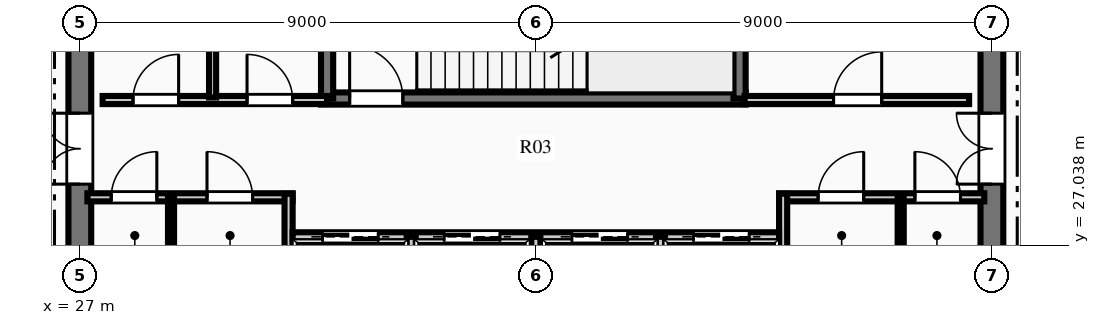
"""IFC4 building model, lengths in metres.
Left out: names, types, materials, properties, quantities, classifications, styles, units other than length and angle.
Written with IfcOpenShell. Run it as: python <this file> out.ifc"""

import sys

from ifc_helpers import new_model, si_unit, direction, frame, frame_2d, origin, place, context, subcontext, project, spatial, rectangle, extrude, element, fill, save


model = new_model("IFC4")
c1 = context("Model", 3, precision=1e-05, world=origin(), true_north=direction((0.0, 1.0)))
c2 = subcontext(c1, "Body", "Model", "MODEL_VIEW")
j1 = project(units=[si_unit("LENGTHUNIT", "METRE"), si_unit("PLANEANGLEUNIT", "RADIAN")], contexts=[c1])
p1 = place(None, origin())
s1 = spatial("IfcSite", under=j1, at=p1, CompositionType="ELEMENT")
p2 = place(p1, origin())
s2 = spatial("IfcBuilding", under=s1, at=p2, CompositionType="ELEMENT")
p3 = place(p2, frame((0.0, 0.0, 298.2)))
s3 = spatial("IfcBuildingStorey", under=s2, at=p3, CompositionType="ELEMENT", Elevation=298.2)
p4 = place(p3, frame((27.0, 18.225, 0.0), z_axis=(0.0, 0.0, 1.0), x_axis=(0.0, 1.0, 0.0)))
e1 = element("IfcWall", 1, at=p4, inside=s3, PredefinedType="SHEAR", context=c2, shape_type="SweptSolid", body=[
    extrude(rectangle(XDim=15.55, YDim=0.45, at=frame_2d((7.775, 0.0))), origin(), (0.0, 0.0, 1.0), 4.5),
])
p5 = place(p4, frame((10.015, 0.0, 0.0)))
e2 = element("IfcOpeningElement", 2, at=p5, cuts=e1, PredefinedType="OPENING", context=c2, shape_type="SweptSolid", body=[
    extrude(rectangle(XDim=1.4, YDim=2.2, at=frame_2d((0.7, 1.1))), frame((0.0, 0.235, 0.0), z_axis=(0.0, -1.0, 0.0), x_axis=(1.0, 0.0, 0.0)), (0.0, 0.0, 1.0), 0.47),
])
p6 = place(p3, frame((45.0, 18.225, 0.0), z_axis=(0.0, 0.0, 1.0), x_axis=(0.0, 1.0, 0.0)))
e3 = element("IfcWall", 3, at=p6, inside=s3, PredefinedType="SHEAR", context=c2, shape_type="SweptSolid", body=[
    extrude(rectangle(XDim=15.55, YDim=0.45, at=frame_2d((7.775, 0.0))), origin(), (0.0, 0.0, 1.0), 4.5),
])
p7 = place(p6, frame((10.015, 0.0, 0.0)))
e4 = element("IfcOpeningElement", 4, at=p7, cuts=e3, PredefinedType="OPENING", context=c2, shape_type="SweptSolid", body=[
    extrude(rectangle(XDim=1.4, YDim=2.2, at=frame_2d((0.7, 1.1))), frame((0.0, 0.235, 0.0), z_axis=(0.0, -1.0, 0.0), x_axis=(1.0, 0.0, 0.0)), (0.0, 0.0, 1.0), 0.47),
])
p8 = place(p3, frame((31.76, 29.93, 0.0), z_axis=(0.0, 0.0, 1.0), x_axis=(1.0, 0.0, 0.0)))
e5 = element("IfcWall", 5, at=p8, inside=s3, PredefinedType="SHEAR", context=c2, shape_type="SweptSolid", body=[
    extrude(rectangle(XDim=8.38, YDim=0.24, at=frame_2d((4.19, 0.0))), origin(), (0.0, 0.0, 1.0), 4.5),
])
p9 = place(p8, frame((0.565, 0.0, 0.0)))
e6 = element("IfcOpeningElement", 6, at=p9, cuts=e5, PredefinedType="OPENING", context=c2, shape_type="SweptSolid", body=[
    extrude(rectangle(XDim=1.05, YDim=2.15, at=frame_2d((0.525, 1.075))), frame((0.0, 0.13, 0.0), z_axis=(0.0, -1.0, 0.0), x_axis=(1.0, 0.0, 0.0)), (0.0, 0.0, 1.0), 0.26),
])
p10 = place(p3, frame((31.88, 29.93, 0.0), z_axis=(0.0, 0.0, 1.0), x_axis=(0.0, 1.0, 0.0)))
e7 = element("IfcWall", 7, at=p10, inside=s3, PredefinedType="SHEAR", context=c2, shape_type="SweptSolid", body=[
    extrude(rectangle(XDim=3.79, YDim=0.24, at=frame_2d((1.895, 0.0))), origin(), (0.0, 0.0, 1.0), 4.5),
])
p11 = place(p3, frame((40.02, 29.93, 0.0), z_axis=(0.0, 0.0, 1.0), x_axis=(0.0, 1.0, 0.0)))
e8 = element("IfcWall", 8, at=p11, inside=s3, PredefinedType="SHEAR", context=c2, shape_type="SweptSolid", body=[
    extrude(rectangle(XDim=3.85, YDim=0.24, at=frame_2d((1.925, 0.0))), origin(), (0.0, 0.0, 1.0), 4.5),
])
p12 = place(p3, frame((27.15, 27.98, 0.0), z_axis=(0.0, 0.0, 1.0), x_axis=(1.0, 0.0, 0.0)))
e9 = element("IfcWall", 9, at=p12, inside=s3, PredefinedType="PARTITIONING", context=c2, shape_type="SweptSolid", body=[
    extrude(rectangle(XDim=4.05, YDim=0.16, at=frame_2d((2.025, 0.0))), origin(), (0.0, 0.0, 1.0), 4.24),
])
p13 = place(p12, frame((0.47, 0.0, 0.0)))
e10 = element("IfcOpeningElement", 10, at=p13, cuts=e9, PredefinedType="OPENING", context=c2, shape_type="SweptSolid", body=[
    extrude(rectangle(XDim=0.9, YDim=2.15, at=frame_2d((0.45, 1.075))), frame((0.0, 0.09, 0.0), z_axis=(0.0, -1.0, 0.0), x_axis=(1.0, 0.0, 0.0)), (0.0, 0.0, 1.0), 0.18),
])
p14 = place(p12, frame((2.36, 0.0, 0.0)))
e11 = element("IfcOpeningElement", 11, at=p14, cuts=e9, PredefinedType="OPENING", context=c2, shape_type="SweptSolid", body=[
    extrude(rectangle(XDim=0.9, YDim=2.15, at=frame_2d((0.45, 1.075))), frame((0.0, 0.09, 0.0), z_axis=(0.0, -1.0, 0.0), x_axis=(1.0, 0.0, 0.0)), (0.0, 0.0, 1.0), 0.18),
])
p15 = place(p3, frame((31.12, 26.54, 0.0), z_axis=(0.0, 0.0, 1.0), x_axis=(0.0, 1.0, 0.0)))
e12 = element("IfcWall", 12, at=p15, inside=s3, PredefinedType="PARTITIONING", context=c2, shape_type="SweptSolid", body=[
    extrude(rectangle(XDim=1.51, YDim=0.16, at=frame_2d((0.755, 0.0))), origin(), (0.0, 0.0, 1.0), 4.24),
])
p16 = place(p3, frame((40.8, 27.98, 0.0), z_axis=(0.0, 0.0, 1.0), x_axis=(1.0, 0.0, 0.0)))
e13 = element("IfcWall", 13, at=p16, inside=s3, PredefinedType="PARTITIONING", context=c2, shape_type="SweptSolid", body=[
    extrude(rectangle(XDim=4.05, YDim=0.16, at=frame_2d((2.025, 0.0))), origin(), (0.0, 0.0, 1.0), 4.24),
])
p17 = place(p16, frame((0.77, 0.0, 0.0)))
e14 = element("IfcOpeningElement", 14, at=p17, cuts=e13, PredefinedType="OPENING", context=c2, shape_type="SweptSolid", body=[
    extrude(rectangle(XDim=0.9, YDim=2.15, at=frame_2d((0.45, 1.075))), frame((0.0, 0.09, 0.0), z_axis=(0.0, -1.0, 0.0), x_axis=(1.0, 0.0, 0.0)), (0.0, 0.0, 1.0), 0.18),
])
p18 = place(p16, frame((2.68, 0.0, 0.0)))
e15 = element("IfcOpeningElement", 15, at=p18, cuts=e13, PredefinedType="OPENING", context=c2, shape_type="SweptSolid", body=[
    extrude(rectangle(XDim=0.9, YDim=2.15, at=frame_2d((0.45, 1.075))), frame((0.0, 0.09, 0.0), z_axis=(0.0, -1.0, 0.0), x_axis=(1.0, 0.0, 0.0)), (0.0, 0.0, 1.0), 0.18),
])
p19 = place(p3, frame((40.88, 26.54, 0.0), z_axis=(0.0, 0.0, 1.0), x_axis=(0.0, 1.0, 0.0)))
e16 = element("IfcWall", 16, at=p19, inside=s3, PredefinedType="PARTITIONING", context=c2, shape_type="SweptSolid", body=[
    extrude(rectangle(XDim=1.51, YDim=0.16, at=frame_2d((0.755, 0.0))), origin(), (0.0, 0.0, 1.0), 4.24),
])
for number, where, z_axis, x_axis in (
    (17, (28.8, 26.54, 0.0), (0.0, 0.0, 1.0), (0.0, 1.0, 0.0)),
    (18, (43.2, 26.54, 0.0), (0.0, 0.0, 1.0), (0.0, 1.0, 0.0)),
):
    element("IfcWall", number, at=place(p3, frame(where, z_axis=z_axis, x_axis=x_axis)), inside=s3, PredefinedType="PARTITIONING", context=c2, shape_type="SweptSolid", body=[
        extrude(rectangle(XDim=1.44, YDim=0.12, at=frame_2d((0.72, 0.0))), origin(), (0.0, 0.0, 1.0), 4.24),
    ])
p20 = place(p3, frame((27.45, 29.9, 0.0), z_axis=(0.0, 0.0, 1.0), x_axis=(1.0, 0.0, 0.0)))
e19 = element("IfcWall", 19, at=p20, inside=s3, PredefinedType="PARTITIONING", context=c2, shape_type="SweptSolid", body=[
    extrude(rectangle(XDim=4.43, YDim=0.16, at=frame_2d((2.215, 0.0))), origin(), (0.0, 0.0, 1.0), 4.24),
])
p21 = place(p20, frame((0.6, 0.0, 0.0)))
e20 = element("IfcOpeningElement", 20, at=p21, cuts=e19, PredefinedType="OPENING", context=c2, shape_type="SweptSolid", body=[
    extrude(rectangle(XDim=0.9, YDim=2.15, at=frame_2d((0.45, 1.075))), frame((0.0, 0.09, 0.0), z_axis=(0.0, -1.0, 0.0), x_axis=(1.0, 0.0, 0.0)), (0.0, 0.0, 1.0), 0.18),
])
p22 = place(p20, frame((2.85, 0.0, 0.0)))
e21 = element("IfcOpeningElement", 21, at=p22, cuts=e19, PredefinedType="OPENING", context=c2, shape_type="SweptSolid", body=[
    extrude(rectangle(XDim=0.9, YDim=2.15, at=frame_2d((0.45, 1.075))), frame((0.0, 0.09, 0.0), z_axis=(0.0, -1.0, 0.0), x_axis=(1.0, 0.0, 0.0)), (0.0, 0.0, 1.0), 0.18),
])
p23 = place(p3, frame((29.62, 29.95, 0.0), z_axis=(0.0, 0.0, 1.0), x_axis=(0.0, 1.0, 0.0)))
e22 = element("IfcWall", 22, at=p23, inside=s3, PredefinedType="PARTITIONING", context=c2, shape_type="SweptSolid", body=[
    extrude(rectangle(XDim=3.6, YDim=0.14, at=frame_2d((1.8, 0.0))), origin(), (0.0, 0.0, 1.0), 4.24),
])
p24 = place(p3, frame((40.12, 29.9, 0.0), z_axis=(0.0, 0.0, 1.0), x_axis=(1.0, 0.0, 0.0)))
e23 = element("IfcWall", 23, at=p24, inside=s3, PredefinedType="PARTITIONING", context=c2, shape_type="SweptSolid", body=[
    extrude(rectangle(XDim=4.43, YDim=0.16, at=frame_2d((2.215, 0.0))), origin(), (0.0, 0.0, 1.0), 4.24),
])
p25 = place(p24, frame((1.755, 0.0, 0.0)))
e24 = element("IfcOpeningElement", 24, at=p25, cuts=e23, PredefinedType="OPENING", context=c2, shape_type="SweptSolid", body=[
    extrude(rectangle(XDim=0.95, YDim=2.15, at=frame_2d((0.475, 1.075))), frame((0.0, 0.09, 0.0), z_axis=(0.0, -1.0, 0.0), x_axis=(1.0, 0.0, 0.0)), (0.0, 0.0, 1.0), 0.18),
])
p26 = place(p3, frame((31.2, 27.2, 0.0), z_axis=(0.0, 0.0, 1.0), x_axis=(1.0, 0.0, 0.0)))
e25 = element("IfcWall", 25, at=p26, inside=s3, PredefinedType="PARTITIONING", context=c2, shape_type="SweptSolid", body=[
    extrude(rectangle(XDim=9.6, YDim=0.18, at=frame_2d((4.8, 0.0))), origin(), (0.0, 0.0, 1.0), 4.24),
])
p27 = place(p26, frame((0.59, 0.0, 0.0)))
e26 = element("IfcOpeningElement", 26, at=p27, cuts=e25, PredefinedType="OPENING", context=c2, shape_type="SweptSolid", body=[
    extrude(rectangle(XDim=1.1, YDim=2.15, at=frame_2d((0.55, 1.075))), frame((0.0, 0.1, 0.0), z_axis=(0.0, -1.0, 0.0), x_axis=(1.0, 0.0, 0.0)), (0.0, 0.0, 1.0), 0.2),
])
p28 = place(p26, frame((2.99, 0.0, 0.0)))
e27 = element("IfcOpeningElement", 27, at=p28, cuts=e25, PredefinedType="OPENING", context=c2, shape_type="SweptSolid", body=[
    extrude(rectangle(XDim=1.1, YDim=2.15, at=frame_2d((0.55, 1.075))), frame((0.0, 0.1, 0.0), z_axis=(0.0, -1.0, 0.0), x_axis=(1.0, 0.0, 0.0)), (0.0, 0.0, 1.0), 0.2),
])
p29 = place(p26, frame((5.51, 0.0, 0.0)))
e28 = element("IfcOpeningElement", 28, at=p29, cuts=e25, PredefinedType="OPENING", context=c2, shape_type="SweptSolid", body=[
    extrude(rectangle(XDim=1.1, YDim=2.15, at=frame_2d((0.55, 1.075))), frame((0.0, 0.1, 0.0), z_axis=(0.0, -1.0, 0.0), x_axis=(1.0, 0.0, 0.0)), (0.0, 0.0, 1.0), 0.2),
])
p30 = place(p26, frame((7.91, 0.0, 0.0)))
e29 = element("IfcOpeningElement", 29, at=p30, cuts=e25, PredefinedType="OPENING", context=c2, shape_type="SweptSolid", body=[
    extrude(rectangle(XDim=1.1, YDim=2.15, at=frame_2d((0.55, 1.075))), frame((0.0, 0.1, 0.0), z_axis=(0.0, -1.0, 0.0), x_axis=(1.0, 0.0, 0.0)), (0.0, 0.0, 1.0), 0.2),
])
for number, where, z_axis, x_axis in (
    (30, (33.54, 25.3, 0.0), (0.0, 0.0, 1.0), (0.0, 1.0, 0.0)),
    (31, (36.0, 25.3, 0.0), (0.0, 0.0, 1.0), (0.0, 1.0, 0.0)),
    (32, (38.46, 25.3, 0.0), (0.0, 0.0, 1.0), (0.0, 1.0, 0.0)),
):
    element("IfcWall", number, at=place(p3, frame(where, z_axis=z_axis, x_axis=x_axis)), inside=s3, PredefinedType="PARTITIONING", context=c2, shape_type="SweptSolid", body=[
        extrude(rectangle(XDim=1.9, YDim=0.18, at=frame_2d((0.95, 0.0))), origin(), (0.0, 0.0, 1.0), 4.24),
    ])
p31 = place(p13, origin())
e33 = element("IfcDoor", 33, at=p31, inside=s3, OperationType="SINGLE_SWING_RIGHT", PredefinedType="DOOR", context=c2, shape_type="SweptSolid", body=[
    extrude(rectangle(XDim=0.9, YDim=2.15, at=frame_2d((0.45, 1.075))), frame((0.0, 0.025, 0.0), z_axis=(0.0, -1.0, 0.0), x_axis=(1.0, 0.0, 0.0)), (0.0, 0.0, 1.0), 0.05),
])
fill(e10, e33)
p32 = place(p14, origin())
e34 = element("IfcDoor", 34, at=p32, inside=s3, OperationType="SINGLE_SWING_LEFT", PredefinedType="DOOR", context=c2, shape_type="SweptSolid", body=[
    extrude(rectangle(XDim=0.9, YDim=2.15, at=frame_2d((0.45, 1.075))), frame((0.0, 0.025, 0.0), z_axis=(0.0, -1.0, 0.0), x_axis=(1.0, 0.0, 0.0)), (0.0, 0.0, 1.0), 0.05),
])
fill(e11, e34)
p33 = place(p17, origin())
e35 = element("IfcDoor", 35, at=p33, inside=s3, OperationType="SINGLE_SWING_RIGHT", PredefinedType="DOOR", context=c2, shape_type="SweptSolid", body=[
    extrude(rectangle(XDim=0.9, YDim=2.15, at=frame_2d((0.45, 1.075))), frame((0.0, 0.025, 0.0), z_axis=(0.0, -1.0, 0.0), x_axis=(1.0, 0.0, 0.0)), (0.0, 0.0, 1.0), 0.05),
])
fill(e14, e35)
p34 = place(p18, origin())
e36 = element("IfcDoor", 36, at=p34, inside=s3, OperationType="SINGLE_SWING_LEFT", PredefinedType="DOOR", context=c2, shape_type="SweptSolid", body=[
    extrude(rectangle(XDim=0.9, YDim=2.15, at=frame_2d((0.45, 1.075))), frame((0.0, 0.025, 0.0), z_axis=(0.0, -1.0, 0.0), x_axis=(1.0, 0.0, 0.0)), (0.0, 0.0, 1.0), 0.05),
])
fill(e15, e36)
p35 = place(p21, origin())
e37 = element("IfcDoor", 37, at=p35, inside=s3, OperationType="SINGLE_SWING_RIGHT", PredefinedType="DOOR", context=c2, shape_type="SweptSolid", body=[
    extrude(rectangle(XDim=0.9, YDim=2.15, at=frame_2d((0.45, 1.075))), frame((0.0, 0.025, 0.0), z_axis=(0.0, -1.0, 0.0), x_axis=(1.0, 0.0, 0.0)), (0.0, 0.0, 1.0), 0.05),
])
fill(e20, e37)
p36 = place(p22, origin())
e38 = element("IfcDoor", 38, at=p36, inside=s3, OperationType="SINGLE_SWING_LEFT", PredefinedType="DOOR", context=c2, shape_type="SweptSolid", body=[
    extrude(rectangle(XDim=0.9, YDim=2.15, at=frame_2d((0.45, 1.075))), frame((0.0, 0.025, 0.0), z_axis=(0.0, -1.0, 0.0), x_axis=(1.0, 0.0, 0.0)), (0.0, 0.0, 1.0), 0.05),
])
fill(e21, e38)
p37 = place(p25, origin())
e39 = element("IfcDoor", 39, at=p37, inside=s3, OperationType="SINGLE_SWING_RIGHT", PredefinedType="DOOR", context=c2, shape_type="SweptSolid", body=[
    extrude(rectangle(XDim=0.95, YDim=2.15, at=frame_2d((0.475, 1.075))), frame((0.0, 0.025, 0.0), z_axis=(0.0, -1.0, 0.0), x_axis=(1.0, 0.0, 0.0)), (0.0, 0.0, 1.0), 0.05),
])
fill(e24, e39)
p38 = place(p9, origin())
e40 = element("IfcDoor", 40, at=p38, inside=s3, OperationType="SINGLE_SWING_LEFT", PredefinedType="DOOR", context=c2, shape_type="SweptSolid", body=[
    extrude(rectangle(XDim=1.05, YDim=2.15, at=frame_2d((0.525, 1.075))), frame((0.0, 0.025, 0.0), z_axis=(0.0, -1.0, 0.0), x_axis=(1.0, 0.0, 0.0)), (0.0, 0.0, 1.0), 0.05),
])
fill(e6, e40)
p39 = place(p5, origin())
e41 = element("IfcDoor", 41, at=p39, inside=s3, OperationType="DOUBLE_DOOR_SINGLE_SWING", PredefinedType="DOOR", context=c2, shape_type="SweptSolid", body=[
    extrude(rectangle(XDim=1.4, YDim=2.2, at=frame_2d((0.7, 1.1))), frame((0.0, 0.025, 0.0), z_axis=(0.0, -1.0, 0.0), x_axis=(1.0, 0.0, 0.0)), (0.0, 0.0, 1.0), 0.05),
])
fill(e2, e41)
p40 = place(p7, origin())
e42 = element("IfcDoor", 42, at=p40, inside=s3, OperationType="DOUBLE_DOOR_SINGLE_SWING", PredefinedType="DOOR", context=c2, shape_type="SweptSolid", body=[
    extrude(rectangle(XDim=1.4, YDim=2.2, at=frame_2d((0.7, 1.1))), frame((0.0, 0.025, 0.0), z_axis=(0.0, -1.0, 0.0), x_axis=(1.0, 0.0, 0.0)), (0.0, 0.0, 1.0), 0.05),
])
fill(e4, e42)
p41 = place(p27, origin())
e43 = element("IfcDoor", 43, at=p41, inside=s3, OperationType="SLIDING_TO_LEFT", PredefinedType="DOOR", context=c2, shape_type="SweptSolid", body=[
    extrude(rectangle(XDim=1.1, YDim=2.15, at=frame_2d((0.55, 1.075))), frame((0.0, 0.025, 0.0), z_axis=(0.0, -1.0, 0.0), x_axis=(1.0, 0.0, 0.0)), (0.0, 0.0, 1.0), 0.05),
])
fill(e26, e43)
p42 = place(p28, origin())
e44 = element("IfcDoor", 44, at=p42, inside=s3, OperationType="SLIDING_TO_LEFT", PredefinedType="DOOR", context=c2, shape_type="SweptSolid", body=[
    extrude(rectangle(XDim=1.1, YDim=2.15, at=frame_2d((0.55, 1.075))), frame((0.0, 0.025, 0.0), z_axis=(0.0, -1.0, 0.0), x_axis=(1.0, 0.0, 0.0)), (0.0, 0.0, 1.0), 0.05),
])
fill(e27, e44)
p43 = place(p29, origin())
e45 = element("IfcDoor", 45, at=p43, inside=s3, OperationType="SLIDING_TO_LEFT", PredefinedType="DOOR", context=c2, shape_type="SweptSolid", body=[
    extrude(rectangle(XDim=1.1, YDim=2.15, at=frame_2d((0.55, 1.075))), frame((0.0, 0.025, 0.0), z_axis=(0.0, -1.0, 0.0), x_axis=(1.0, 0.0, 0.0)), (0.0, 0.0, 1.0), 0.05),
])
fill(e28, e45)
p44 = place(p30, origin())
e46 = element("IfcDoor", 46, at=p44, inside=s3, OperationType="SLIDING_TO_LEFT", PredefinedType="DOOR", context=c2, shape_type="SweptSolid", body=[
    extrude(rectangle(XDim=1.1, YDim=2.15, at=frame_2d((0.55, 1.075))), frame((0.0, 0.025, 0.0), z_axis=(0.0, -1.0, 0.0), x_axis=(1.0, 0.0, 0.0)), (0.0, 0.0, 1.0), 0.05),
])
fill(e29, e46)
save(model, sys.argv[1])
